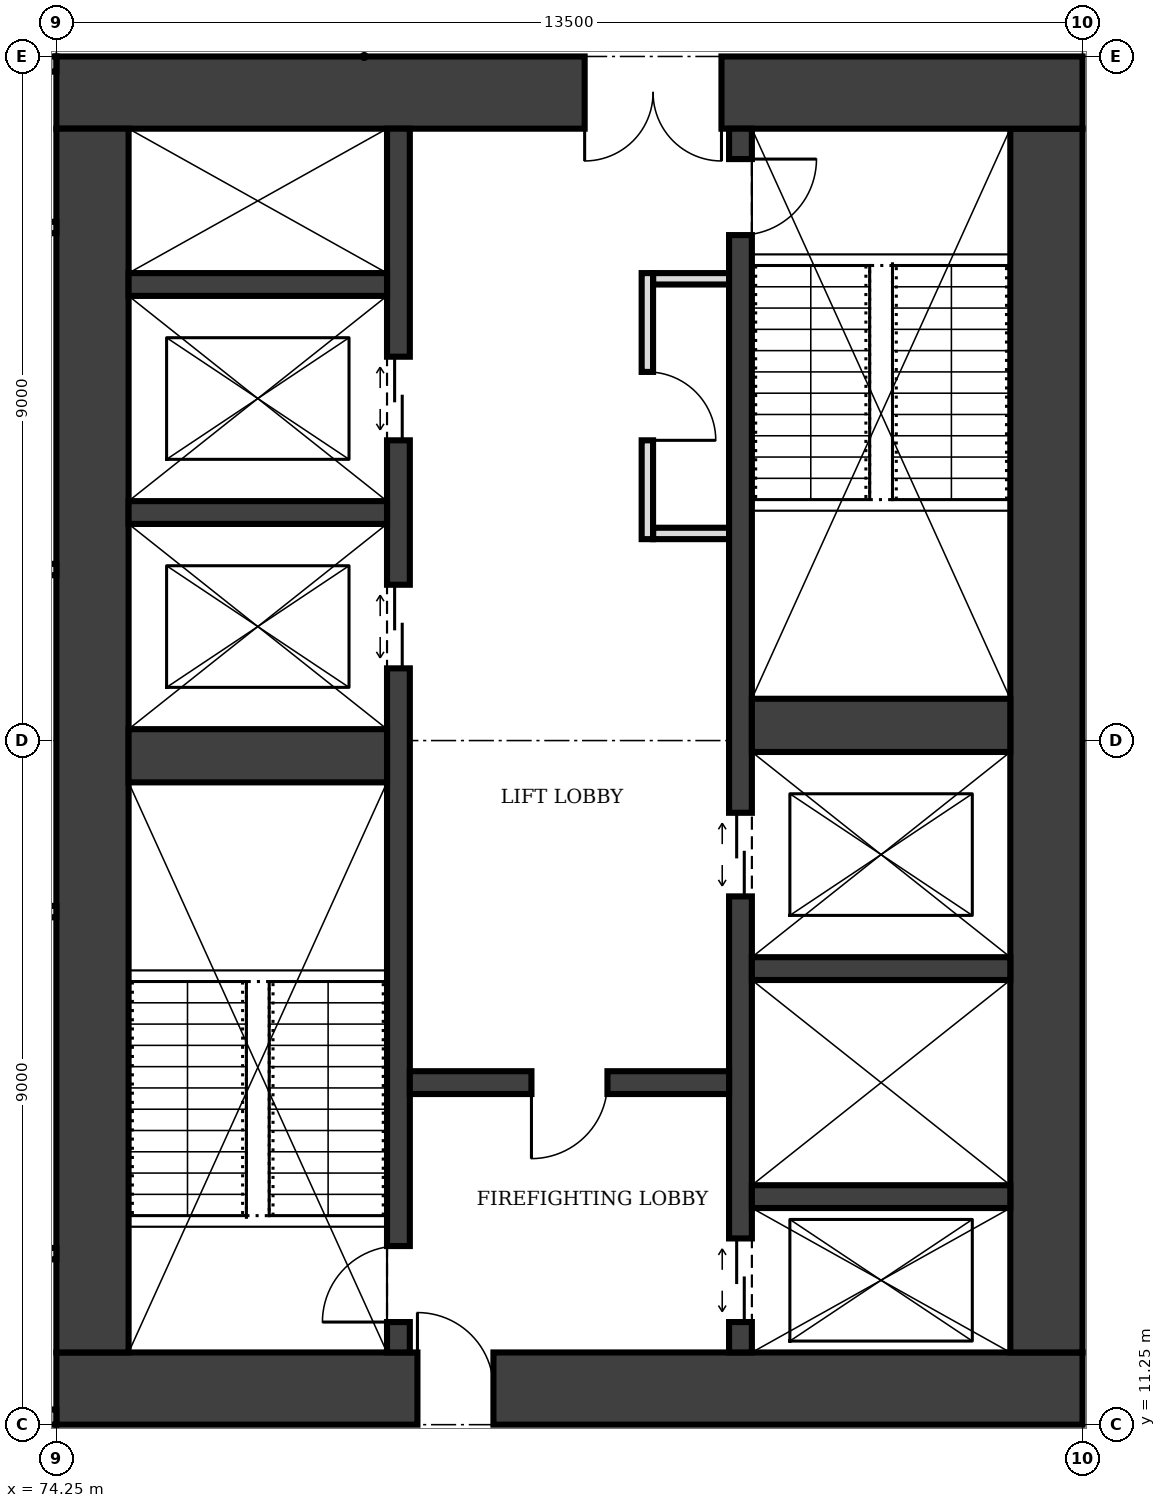
"""IFC4 building model, lengths in metres.
Left out: names, types, materials, properties, quantities, classifications, styles, units other than length and angle.
Written with IfcOpenShell. Run it as: python <this file> out.ifc"""

import sys

from ifc_helpers import new_model, si_unit, direction, frame, frame_2d, origin, place, context, subcontext, project, spatial, rectangle, extrude, element, fill, save


model = new_model("IFC4")
c1 = context("Model", 3, precision=1e-05, world=origin(), true_north=direction((0.0, 1.0)))
c2 = subcontext(c1, "Body", "Model", "MODEL_VIEW")
j1 = project(units=[si_unit("LENGTHUNIT", "METRE"), si_unit("PLANEANGLEUNIT", "RADIAN")], contexts=[c1])
p1 = place(None, origin())
s1 = spatial("IfcSite", under=j1, at=p1, CompositionType="ELEMENT")
p2 = place(p1, origin())
s2 = spatial("IfcBuilding", under=s1, at=p2, CompositionType="ELEMENT")
p3 = place(p2, frame((0.0, 0.0, 93.0)))
s3 = spatial("IfcBuildingStorey", under=s2, at=p3, CompositionType="ELEMENT", Elevation=93.0)
p4 = place(p3, frame((74.25, 11.725, 0.0), z_axis=(0.0, 0.0, 1.0), x_axis=(1.0, 0.0, 0.0)))
e1 = element("IfcWall", 1, at=p4, inside=s3, PredefinedType="SHEAR", context=c2, shape_type="SweptSolid", body=[
    extrude(rectangle(XDim=13.5, YDim=0.95, at=frame_2d((6.75, 0.0))), origin(), (0.0, 0.0, 1.0), 4.0),
])
p5 = place(p4, frame((4.75, 0.0, 0.0)))
e2 = element("IfcOpeningElement", 2, at=p5, cuts=e1, PredefinedType="OPENING", context=c2, shape_type="SweptSolid", body=[
    extrude(rectangle(XDim=1.0, YDim=2.1, at=frame_2d((0.5, 1.05))), frame((0.0, 0.485, 0.0), z_axis=(0.0, -1.0, 0.0), x_axis=(1.0, 0.0, 0.0)), (0.0, 0.0, 1.0), 0.97),
])
p6 = place(p3, frame((87.275, 12.2, 0.0), z_axis=(0.0, 0.0, 1.0), x_axis=(0.0, 1.0, 0.0)))
e3 = element("IfcWall", 3, at=p6, inside=s3, PredefinedType="SHEAR", context=c2, shape_type="SweptSolid", body=[
    extrude(rectangle(XDim=16.1, YDim=0.95, at=frame_2d((8.05, 0.0))), origin(), (0.0, 0.0, 1.0), 4.0),
])
p7 = place(p3, frame((87.75, 28.775, 0.0), z_axis=(0.0, 0.0, 1.0), x_axis=(-1.0, 0.0, 0.0)))
e4 = element("IfcWall", 4, at=p7, inside=s3, PredefinedType="SHEAR", context=c2, shape_type="SweptSolid", body=[
    extrude(rectangle(XDim=13.5, YDim=0.95, at=frame_2d((6.75, 0.0))), origin(), (0.0, 0.0, 1.0), 4.0),
])
p8 = place(p7, frame((4.75, 0.0, 0.0)))
e5 = element("IfcOpeningElement", 5, at=p8, cuts=e4, PredefinedType="OPENING", context=c2, shape_type="SweptSolid", body=[
    extrude(rectangle(XDim=1.8, YDim=2.1, at=frame_2d((0.9, 1.05))), frame((0.0, 0.485, 0.0), z_axis=(0.0, -1.0, 0.0), x_axis=(1.0, 0.0, 0.0)), (0.0, 0.0, 1.0), 0.97),
])
p9 = place(p3, frame((74.725, 28.3, 0.0), z_axis=(0.0, 0.0, 1.0), x_axis=(0.0, -1.0, 0.0)))
e6 = element("IfcWall", 6, at=p9, inside=s3, PredefinedType="SHEAR", context=c2, shape_type="SweptSolid", body=[
    extrude(rectangle(XDim=16.1, YDim=0.95, at=frame_2d((8.05, 0.0))), origin(), (0.0, 0.0, 1.0), 4.0),
])
p10 = place(p3, frame((78.75, 12.2, 0.0), z_axis=(0.0, 0.0, 1.0), x_axis=(0.0, 1.0, 0.0)))
e7 = element("IfcWall", 7, at=p10, inside=s3, PredefinedType="SHEAR", context=c2, shape_type="SweptSolid", body=[
    extrude(rectangle(XDim=16.1, YDim=0.3, at=frame_2d((8.05, 0.0))), origin(), (0.0, 0.0, 1.0), 4.0),
])
p11 = place(p10, frame((0.4, 0.0, 0.0)))
e8 = element("IfcOpeningElement", 8, at=p11, cuts=e7, PredefinedType="OPENING", context=c2, shape_type="SweptSolid", body=[
    extrude(rectangle(XDim=1.0, YDim=2.1, at=frame_2d((0.5, 1.05))), frame((0.0, 0.16, 0.0), z_axis=(0.0, -1.0, 0.0), x_axis=(1.0, 0.0, 0.0)), (0.0, 0.0, 1.0), 0.32),
])
p12 = place(p10, frame((9.0, 0.0, 0.0)))
e9 = element("IfcOpeningElement", 9, at=p12, cuts=e7, PredefinedType="OPENING", context=c2, shape_type="SweptSolid", body=[
    extrude(rectangle(XDim=1.1, YDim=2.1, at=frame_2d((0.55, 1.05))), frame((0.0, 0.16, 0.0), z_axis=(0.0, -1.0, 0.0), x_axis=(1.0, 0.0, 0.0)), (0.0, 0.0, 1.0), 0.32),
])
p13 = place(p10, frame((12.0, 0.0, 0.0)))
e10 = element("IfcOpeningElement", 10, at=p13, cuts=e7, PredefinedType="OPENING", context=c2, shape_type="SweptSolid", body=[
    extrude(rectangle(XDim=1.1, YDim=2.1, at=frame_2d((0.55, 1.05))), frame((0.0, 0.16, 0.0), z_axis=(0.0, -1.0, 0.0), x_axis=(1.0, 0.0, 0.0)), (0.0, 0.0, 1.0), 0.32),
])
p14 = place(p3, frame((83.25, 12.2, 0.0), z_axis=(0.0, 0.0, 1.0), x_axis=(0.0, 1.0, 0.0)))
e11 = element("IfcWall", 11, at=p14, inside=s3, PredefinedType="SHEAR", context=c2, shape_type="SweptSolid", body=[
    extrude(rectangle(XDim=16.1, YDim=0.3, at=frame_2d((8.05, 0.0))), origin(), (0.0, 0.0, 1.0), 4.0),
])
p15 = place(p14, frame((14.7, 0.0, 0.0)))
e12 = element("IfcOpeningElement", 12, at=p15, cuts=e11, PredefinedType="OPENING", context=c2, shape_type="SweptSolid", body=[
    extrude(rectangle(XDim=1.0, YDim=2.1, at=frame_2d((0.5, 1.05))), frame((0.0, 0.16, 0.0), z_axis=(0.0, -1.0, 0.0), x_axis=(1.0, 0.0, 0.0)), (0.0, 0.0, 1.0), 0.32),
])
p16 = place(p14, frame((0.4, 0.0, 0.0)))
e13 = element("IfcOpeningElement", 13, at=p16, cuts=e11, PredefinedType="OPENING", context=c2, shape_type="SweptSolid", body=[
    extrude(rectangle(XDim=1.1, YDim=2.1, at=frame_2d((0.55, 1.05))), frame((0.0, 0.16, 0.0), z_axis=(0.0, -1.0, 0.0), x_axis=(1.0, 0.0, 0.0)), (0.0, 0.0, 1.0), 0.32),
])
p17 = place(p14, frame((6.0, 0.0, 0.0)))
e14 = element("IfcOpeningElement", 14, at=p17, cuts=e11, PredefinedType="OPENING", context=c2, shape_type="SweptSolid", body=[
    extrude(rectangle(XDim=1.1, YDim=2.1, at=frame_2d((0.55, 1.05))), frame((0.0, 0.16, 0.0), z_axis=(0.0, -1.0, 0.0), x_axis=(1.0, 0.0, 0.0)), (0.0, 0.0, 1.0), 0.32),
])
p18 = place(p3, frame((75.2, 20.05, 0.0), z_axis=(0.0, 0.0, 1.0), x_axis=(1.0, 0.0, 0.0)))
e15 = element("IfcWall", 15, at=p18, inside=s3, PredefinedType="SHEAR", context=c2, shape_type="SweptSolid", body=[
    extrude(rectangle(XDim=3.4, YDim=0.7, at=frame_2d((1.7, 0.0))), origin(), (0.0, 0.0, 1.0), 4.0),
])
p19 = place(p3, frame((78.9, 15.75, 0.0), z_axis=(0.0, 0.0, 1.0), x_axis=(1.0, 0.0, 0.0)))
e16 = element("IfcWall", 16, at=p19, inside=s3, PredefinedType="SHEAR", context=c2, shape_type="SweptSolid", body=[
    extrude(rectangle(XDim=4.2, YDim=0.3, at=frame_2d((2.1, 0.0))), origin(), (0.0, 0.0, 1.0), 4.0),
])
p20 = place(p19, frame((1.6, 0.0, 0.0)))
e17 = element("IfcOpeningElement", 17, at=p20, cuts=e16, PredefinedType="OPENING", context=c2, shape_type="SweptSolid", body=[
    extrude(rectangle(XDim=1.0, YDim=2.1, at=frame_2d((0.5, 1.05))), frame((0.0, 0.16, 0.0), z_axis=(0.0, -1.0, 0.0), x_axis=(1.0, 0.0, 0.0)), (0.0, 0.0, 1.0), 0.32),
])
for number, where, z_axis, x_axis in (
    (18, (83.4, 14.25, 0.0), (0.0, 0.0, 1.0), (1.0, 0.0, 0.0)),
    (19, (83.4, 17.25, 0.0), (0.0, 0.0, 1.0), (1.0, 0.0, 0.0)),
):
    element("IfcWall", number, at=place(p3, frame(where, z_axis=z_axis, x_axis=x_axis)), inside=s3, PredefinedType="SHEAR", context=c2, shape_type="SweptSolid", body=[
        extrude(rectangle(XDim=3.4, YDim=0.3, at=frame_2d((1.7, 0.0))), origin(), (0.0, 0.0, 1.0), 4.0),
    ])
p21 = place(p3, frame((83.4, 20.45, 0.0), z_axis=(0.0, 0.0, 1.0), x_axis=(1.0, 0.0, 0.0)))
e20 = element("IfcWall", 20, at=p21, inside=s3, PredefinedType="SHEAR", context=c2, shape_type="SweptSolid", body=[
    extrude(rectangle(XDim=3.4, YDim=0.7, at=frame_2d((1.7, 0.0))), origin(), (0.0, 0.0, 1.0), 4.0),
])
for number, where, z_axis, x_axis in (
    (21, (75.2, 23.25, 0.0), (0.0, 0.0, 1.0), (1.0, 0.0, 0.0)),
    (22, (75.2, 26.25, 0.0), (0.0, 0.0, 1.0), (1.0, 0.0, 0.0)),
):
    element("IfcWall", number, at=place(p3, frame(where, z_axis=z_axis, x_axis=x_axis)), inside=s3, PredefinedType="SHEAR", context=c2, shape_type="SweptSolid", body=[
        extrude(rectangle(XDim=3.4, YDim=0.3, at=frame_2d((1.7, 0.0))), origin(), (0.0, 0.0, 1.0), 4.0),
    ])
p22 = place(p3, frame((82.025, 22.9, 0.0), z_axis=(0.0, 0.0, 1.0), x_axis=(0.0, 1.0, 0.0)))
e23 = element("IfcWall", 23, at=p22, inside=s3, PredefinedType="PARTITIONING", context=c2, shape_type="SweptSolid", body=[
    extrude(rectangle(XDim=3.5, YDim=0.15, at=frame_2d((1.75, 0.0))), origin(), (0.0, 0.0, 1.0), 3.75),
])
p23 = place(p22, frame((1.3, 0.0, 0.0)))
e24 = element("IfcOpeningElement", 24, at=p23, cuts=e23, PredefinedType="OPENING", context=c2, shape_type="SweptSolid", body=[
    extrude(rectangle(XDim=0.9, YDim=2.1, at=frame_2d((0.45, 1.05))), frame((0.0, 0.085, 0.0), z_axis=(0.0, -1.0, 0.0), x_axis=(1.0, 0.0, 0.0)), (0.0, 0.0, 1.0), 0.17),
])
for number, where, z_axis, x_axis in (
    (25, (82.1, 22.975, 0.0), (0.0, 0.0, 1.0), (1.0, 0.0, 0.0)),
    (26, (82.1, 26.325, 0.0), (0.0, 0.0, 1.0), (1.0, 0.0, 0.0)),
):
    element("IfcWall", number, at=place(p3, frame(where, z_axis=z_axis, x_axis=x_axis)), inside=s3, PredefinedType="PARTITIONING", context=c2, shape_type="SweptSolid", body=[
        extrude(rectangle(XDim=1.0, YDim=0.15, at=frame_2d((0.5, 0.0))), origin(), (0.0, 0.0, 1.0), 3.75),
    ])
for number, where, z_axis, x_axis in (
    (27, (68.57, 11.35, 0.0), (0.0, 0.0, 1.0), (1.0, 0.0, 0.0)),
    (28, (68.57, 29.15, 0.0), (0.0, 0.0, 1.0), (1.0, 0.0, 0.0)),
):
    element("IfcWall", number, at=place(p3, frame(where, z_axis=z_axis, x_axis=x_axis)), inside=s3, PredefinedType="SOLIDWALL", context=c2, shape_type="SweptSolid", body=[
        extrude(rectangle(XDim=5.68, YDim=0.2, at=frame_2d((2.84, 0.0))), origin(), (0.0, 0.0, 1.0), 2.85),
    ])
for number, where, z_axis, x_axis in (
    (29, (65.15, 13.5, 0.0), (0.0, 0.0, 1.0), (1.0, 0.0, 0.0)),
    (30, (65.15, 18.0, 0.0), (0.0, 0.0, 1.0), (1.0, 0.0, 0.0)),
    (31, (65.15, 22.5, 0.0), (0.0, 0.0, 1.0), (1.0, 0.0, 0.0)),
    (32, (65.15, 27.0, 0.0), (0.0, 0.0, 1.0), (1.0, 0.0, 0.0)),
):
    element("IfcWall", number, at=place(p3, frame(where, z_axis=z_axis, x_axis=x_axis)), inside=s3, PredefinedType="PARTITIONING", context=c2, shape_type="SweptSolid", body=[
        extrude(rectangle(XDim=9.1, YDim=0.15, at=frame_2d((4.55, 0.0))), origin(), (0.0, 0.0, 1.0), 3.75),
    ])
p24 = place(p5, origin())
e33 = element("IfcDoor", 33, at=p24, inside=s3, OperationType="SINGLE_SWING_LEFT", PredefinedType="DOOR", context=c2, shape_type="SweptSolid", body=[
    extrude(rectangle(XDim=1.0, YDim=2.1, at=frame_2d((0.5, 1.05))), frame((0.0, 0.025, 0.0), z_axis=(0.0, -1.0, 0.0), x_axis=(1.0, 0.0, 0.0)), (0.0, 0.0, 1.0), 0.05),
])
fill(e2, e33)
p25 = place(p8, origin())
e34 = element("IfcDoor", 34, at=p25, inside=s3, OperationType="DOUBLE_DOOR_SINGLE_SWING", PredefinedType="DOOR", context=c2, shape_type="SweptSolid", body=[
    extrude(rectangle(XDim=1.8, YDim=2.1, at=frame_2d((0.9, 1.05))), frame((0.0, 0.025, 0.0), z_axis=(0.0, -1.0, 0.0), x_axis=(1.0, 0.0, 0.0)), (0.0, 0.0, 1.0), 0.05),
])
fill(e5, e34)
p26 = place(p20, frame((1.0, 0.0, 0.0), z_axis=(0.0, 0.0, 1.0), x_axis=(-1.0, 0.0, 0.0)))
e35 = element("IfcDoor", 35, at=p26, inside=s3, OperationType="SINGLE_SWING_RIGHT", PredefinedType="DOOR", context=c2, shape_type="SweptSolid", body=[
    extrude(rectangle(XDim=1.0, YDim=2.1, at=frame_2d((0.5, 1.05))), frame((0.0, 0.025, 0.0), z_axis=(0.0, -1.0, 0.0), x_axis=(1.0, 0.0, 0.0)), (0.0, 0.0, 1.0), 0.05),
])
fill(e17, e35)
p27 = place(p11, origin())
e36 = element("IfcDoor", 36, at=p27, inside=s3, OperationType="SINGLE_SWING_LEFT", PredefinedType="DOOR", context=c2, shape_type="SweptSolid", body=[
    extrude(rectangle(XDim=1.0, YDim=2.1, at=frame_2d((0.5, 1.05))), frame((0.0, 0.025, 0.0), z_axis=(0.0, -1.0, 0.0), x_axis=(1.0, 0.0, 0.0)), (0.0, 0.0, 1.0), 0.05),
])
fill(e8, e36)
p28 = place(p15, frame((1.0, 0.0, 0.0), z_axis=(0.0, 0.0, 1.0), x_axis=(-1.0, 0.0, 0.0)))
e37 = element("IfcDoor", 37, at=p28, inside=s3, OperationType="SINGLE_SWING_LEFT", PredefinedType="DOOR", context=c2, shape_type="SweptSolid", body=[
    extrude(rectangle(XDim=1.0, YDim=2.1, at=frame_2d((0.5, 1.05))), frame((0.0, 0.025, 0.0), z_axis=(0.0, -1.0, 0.0), x_axis=(1.0, 0.0, 0.0)), (0.0, 0.0, 1.0), 0.05),
])
fill(e12, e37)
p29 = place(p16, origin())
e38 = element("IfcDoor", 38, at=p29, inside=s3, OperationType="DOUBLE_DOOR_SLIDING", PredefinedType="DOOR", context=c2, shape_type="SweptSolid", body=[
    extrude(rectangle(XDim=1.1, YDim=2.1, at=frame_2d((0.55, 1.05))), frame((0.0, 0.025, 0.0), z_axis=(0.0, -1.0, 0.0), x_axis=(1.0, 0.0, 0.0)), (0.0, 0.0, 1.0), 0.05),
])
fill(e13, e38)
p30 = place(p12, origin())
e39 = element("IfcDoor", 39, at=p30, inside=s3, OperationType="DOUBLE_DOOR_SLIDING", PredefinedType="DOOR", context=c2, shape_type="SweptSolid", body=[
    extrude(rectangle(XDim=1.1, YDim=2.1, at=frame_2d((0.55, 1.05))), frame((0.0, 0.025, 0.0), z_axis=(0.0, -1.0, 0.0), x_axis=(1.0, 0.0, 0.0)), (0.0, 0.0, 1.0), 0.05),
])
fill(e9, e39)
p31 = place(p13, origin())
e40 = element("IfcDoor", 40, at=p31, inside=s3, OperationType="DOUBLE_DOOR_SLIDING", PredefinedType="DOOR", context=c2, shape_type="SweptSolid", body=[
    extrude(rectangle(XDim=1.1, YDim=2.1, at=frame_2d((0.55, 1.05))), frame((0.0, 0.025, 0.0), z_axis=(0.0, -1.0, 0.0), x_axis=(1.0, 0.0, 0.0)), (0.0, 0.0, 1.0), 0.05),
])
fill(e10, e40)
p32 = place(p17, origin())
e41 = element("IfcDoor", 41, at=p32, inside=s3, OperationType="DOUBLE_DOOR_SLIDING", PredefinedType="DOOR", context=c2, shape_type="SweptSolid", body=[
    extrude(rectangle(XDim=1.1, YDim=2.1, at=frame_2d((0.55, 1.05))), frame((0.0, 0.025, 0.0), z_axis=(0.0, -1.0, 0.0), x_axis=(1.0, 0.0, 0.0)), (0.0, 0.0, 1.0), 0.05),
])
fill(e14, e41)
p33 = place(p23, frame((0.9, 0.0, 0.0), z_axis=(0.0, 0.0, 1.0), x_axis=(-1.0, 0.0, 0.0)))
e42 = element("IfcDoor", 42, at=p33, inside=s3, OperationType="SINGLE_SWING_RIGHT", PredefinedType="DOOR", context=c2, shape_type="SweptSolid", body=[
    extrude(rectangle(XDim=0.9, YDim=2.1, at=frame_2d((0.45, 1.05))), frame((0.0, 0.025, 0.0), z_axis=(0.0, -1.0, 0.0), x_axis=(1.0, 0.0, 0.0)), (0.0, 0.0, 1.0), 0.05),
])
fill(e24, e42)
save(model, sys.argv[1])
